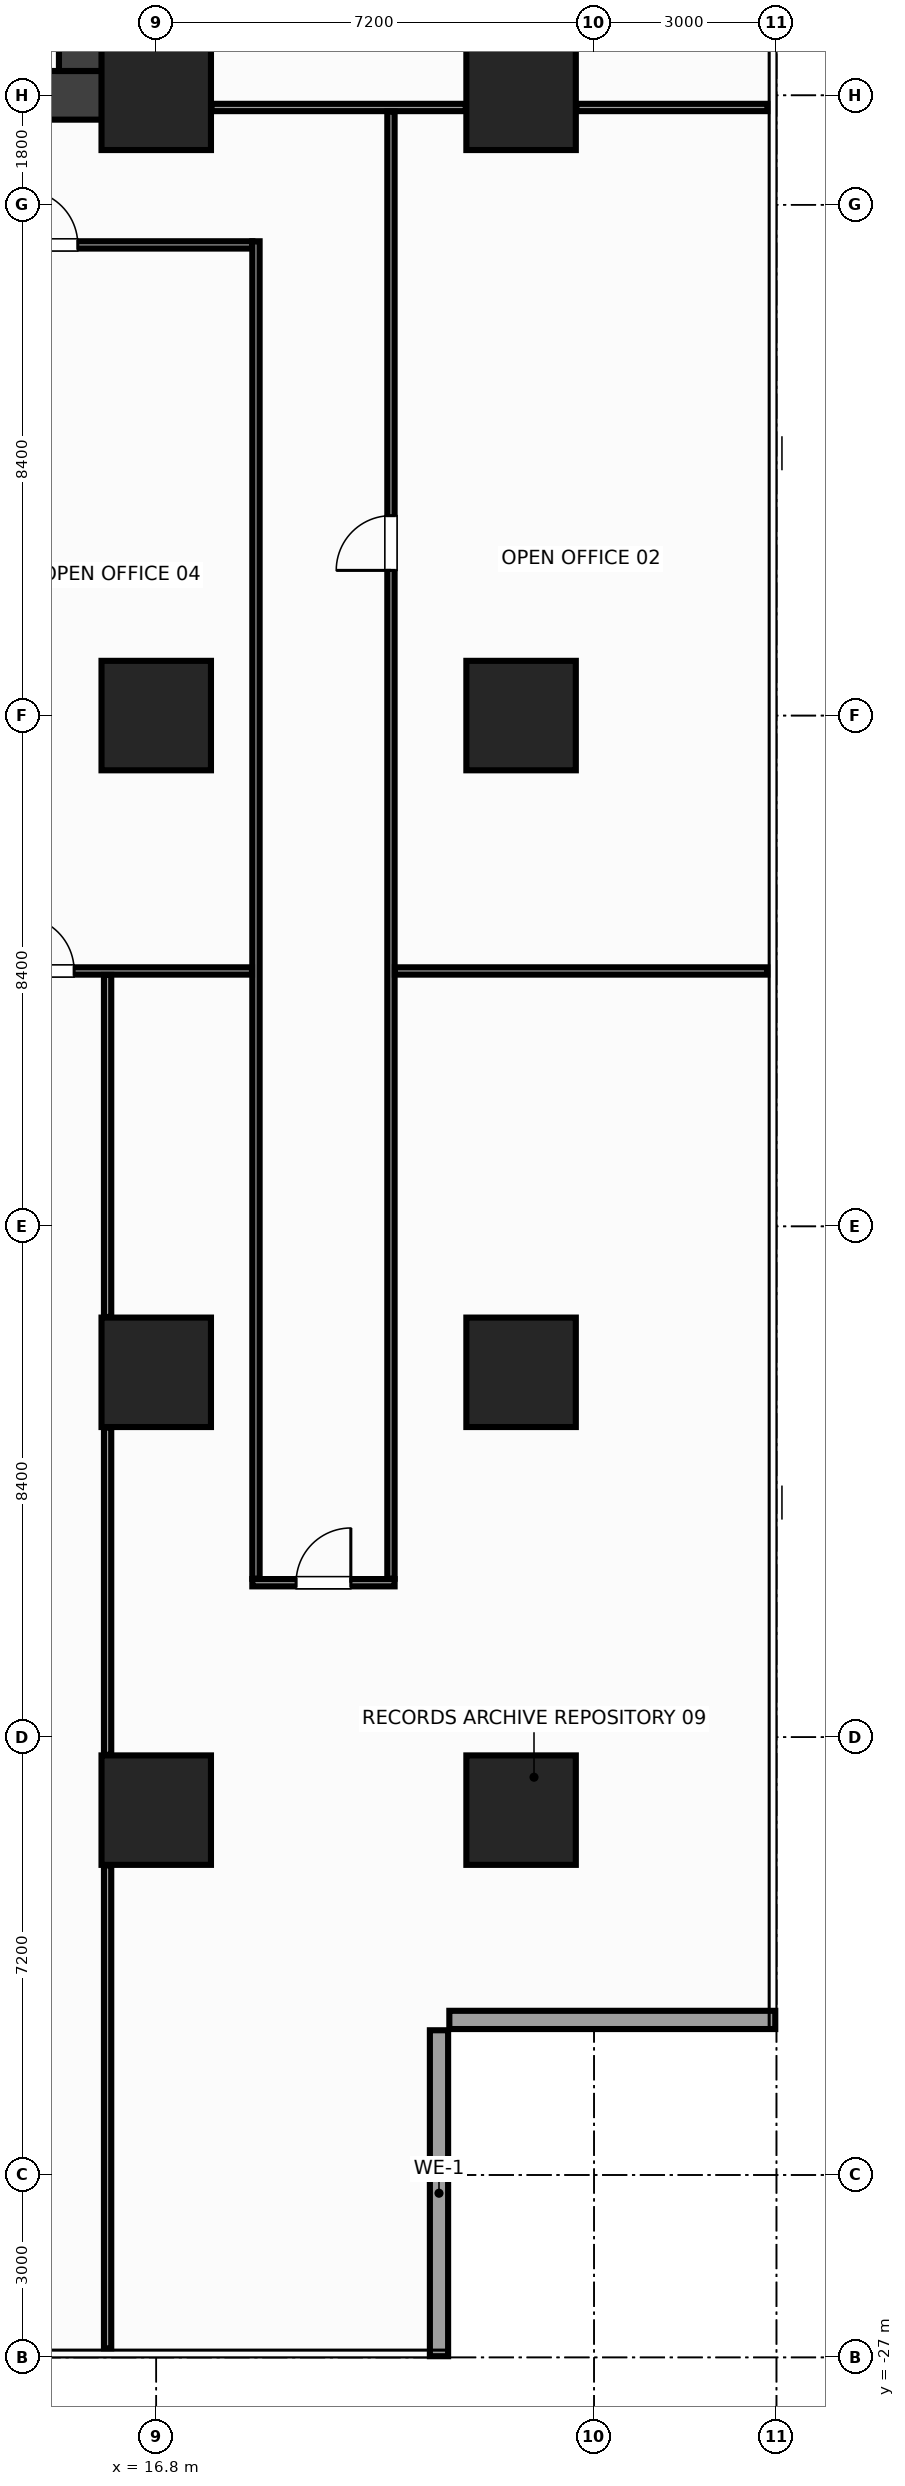
"""IFC4 building model, lengths in metres.
Left out: names, types, materials, properties, quantities, classifications, styles, units other than length and angle.
Written with IfcOpenShell. Run it as: python <this file> out.ifc"""

import sys

from ifc_helpers import new_model, si_unit, direction, frame, frame_2d, origin, origin_2d, place, context, subcontext, project, spatial, rectangle, extrude, source, transform, mapped, element, fill, save


model = new_model("IFC4")
c1 = context("Model", 3, precision=1e-05, world=origin(), true_north=direction((0.0, 1.0)))
c2 = subcontext(c1, "Body", "Model", "MODEL_VIEW")
j1 = project(units=[si_unit("LENGTHUNIT", "METRE"), si_unit("PLANEANGLEUNIT", "RADIAN")], contexts=[c1])
p1 = place(None, origin())
s1 = spatial("IfcSite", under=j1, at=p1, CompositionType="ELEMENT")
p2 = place(p1, origin())
s2 = spatial("IfcBuilding", under=s1, at=p2, CompositionType="ELEMENT")
p3 = place(p2, frame((0.0, 0.0, 30.8)))
s3 = spatial("IfcBuildingStorey", under=s2, at=p3, CompositionType="ELEMENT", Elevation=30.8)
m1 = source(origin(), c2, "Body", "SweptSolid", [
    extrude(rectangle(XDim=32.0, YDim=0.8, at=frame_2d((16.0, 0.0))), origin(), (0.0, 0.0, 1.0), 3.6),
])
p4 = place(p3, frame((-16.0, 10.2, 0.0), z_axis=(0.0, 0.0, 1.0), x_axis=(1.0, 0.0, 0.0)))
e1 = element("IfcWall", 1, at=p4, inside=s3, PredefinedType="SHEAR", context=c2, shape_type="MappedRepresentation", body=[
    mapped(m1, transform((0.0, 0.0, 0.0), x_axis=(1.0, 0.0, 0.0), y_axis=(0.0, 1.0, 0.0), z_axis=(0.0, 0.0, 1.0), scale=1.0)),
])
p5 = place(p4, frame((1.85, 0.0, 0.0)))
e2 = element("IfcOpeningElement", 2, at=p5, cuts=e1, PredefinedType="OPENING", context=c2, shape_type="SweptSolid", body=[
    extrude(rectangle(XDim=1.6, YDim=2.15, at=frame_2d((0.8, 1.075))), frame((0.0, 0.412, 0.0), z_axis=(0.0, -1.0, 0.0), x_axis=(1.0, 0.0, 0.0)), (0.0, 0.0, 1.0), 0.824),
])
p6 = place(p4, frame((28.55, 0.0, 0.0)))
e3 = element("IfcOpeningElement", 3, at=p6, cuts=e1, PredefinedType="OPENING", context=c2, shape_type="SweptSolid", body=[
    extrude(rectangle(XDim=1.6, YDim=2.15, at=frame_2d((0.8, 1.075))), frame((0.0, 0.412, 0.0), z_axis=(0.0, -1.0, 0.0), x_axis=(1.0, 0.0, 0.0)), (0.0, 0.0, 1.0), 0.824),
])
p7 = place(p4, frame((15.25, 0.0, 0.0)))
e4 = element("IfcOpeningElement", 4, at=p7, cuts=e1, PredefinedType="OPENING", context=c2, shape_type="SweptSolid", body=[
    extrude(rectangle(XDim=1.5, YDim=2.2, at=frame_2d((0.75, 1.1))), frame((0.0, 0.412, 0.0), z_axis=(0.0, -1.0, 0.0), x_axis=(1.0, 0.0, 0.0)), (0.0, 0.0, 1.0), 0.824),
])
m2 = source(origin(), c2, "Body", "SweptSolid", [
    extrude(rectangle(XDim=12.8, YDim=0.8, at=frame_2d((6.4, 0.0))), origin(), (0.0, 0.0, 1.0), 3.6),
])
p8 = place(p3, frame((15.6, 10.6, 0.0), z_axis=(0.0, 0.0, 1.0), x_axis=(0.0, 1.0, 0.0)))
e5 = element("IfcWall", 5, at=p8, inside=s3, PredefinedType="SHEAR", context=c2, shape_type="MappedRepresentation", body=[
    mapped(m2, transform((0.0, 0.0, 0.0), x_axis=(1.0, 0.0, 0.0), y_axis=(0.0, 1.0, 0.0), z_axis=(0.0, 0.0, 1.0), scale=1.0)),
])
m3 = source(origin(), c2, "Body", "SweptSolid", [
    extrude(rectangle(XDim=1.8, YDim=1.8, at=origin_2d()), origin(), (0.0, 0.0, 1.0), 3.6),
])
for number, where, z_axis, x_axis in (
    (6, (16.8, -18.0, 0.0), (0.0, 0.0, 1.0), (1.0, 0.0, 0.0)),
    (7, (16.8, -10.8, 0.0), (0.0, 0.0, 1.0), (1.0, 0.0, 0.0)),
    (8, (16.8, 0.0, 0.0), (0.0, 0.0, 1.0), (1.0, 0.0, 0.0)),
    (9, (16.8, 10.2, 0.0), (0.0, 0.0, 1.0), (1.0, 0.0, 0.0)),
    (10, (22.8, -18.0, 0.0), (0.0, 0.0, 1.0), (1.0, 0.0, 0.0)),
    (11, (22.8, -10.8, 0.0), (0.0, 0.0, 1.0), (1.0, 0.0, 0.0)),
    (12, (22.8, 0.0, 0.0), (0.0, 0.0, 1.0), (1.0, 0.0, 0.0)),
    (13, (22.8, 10.2, 0.0), (0.0, 0.0, 1.0), (1.0, 0.0, 0.0)),
):
    element("IfcColumn", number, at=place(p3, frame(where, z_axis=z_axis, x_axis=x_axis)), inside=s3, PredefinedType="COLUMN", context=c2, shape_type="MappedRepresentation", body=[
        mapped(m3, transform((0.0, 0.0, 0.0), x_axis=(1.0, 0.0, 0.0), y_axis=(0.0, 1.0, 0.0), z_axis=(0.0, 0.0, 1.0), scale=1.0)),
    ])
m4 = source(origin(), c2, "Body", "SweptSolid", [
    extrude(rectangle(XDim=5.36, YDim=0.3, at=frame_2d((2.68, 0.0))), origin(), (0.0, 0.0, 1.0), 2.74),
])
for number, where, z_axis, x_axis in (
    (14, (21.45, -26.98, 0.0), (0.0, 0.0, 1.0), (0.0, 1.0, 0.0)),
    (15, (21.62, -21.45, 0.0), (0.0, 0.0, 1.0), (1.0, 0.0, 0.0)),
):
    element("IfcWall", number, at=place(p3, frame(where, z_axis=z_axis, x_axis=x_axis)), inside=s3, PredefinedType="STANDARD", context=c2, shape_type="MappedRepresentation", body=[
        mapped(m4, transform((0.0, 0.0, 0.0), x_axis=(1.0, 0.0, 0.0), y_axis=(0.0, 1.0, 0.0), z_axis=(0.0, 0.0, 1.0), scale=1.0)),
    ])
m5 = source(origin(), c2, "Body", "SweptSolid", [
    extrude(rectangle(XDim=4.18, YDim=0.12, at=frame_2d((2.09, 0.0))), origin(), (0.0, 0.0, 1.0), 2.745),
])
p9 = place(p3, frame((17.71, 10.0, 0.0), z_axis=(0.0, 0.0, 1.0), x_axis=(1.0, 0.0, 0.0)))
e16 = element("IfcWall", 16, at=p9, inside=s3, PredefinedType="PARTITIONING", context=c2, shape_type="MappedRepresentation", body=[
    mapped(m5, transform((0.0, 0.0, 0.0), x_axis=(1.0, 0.0, 0.0), y_axis=(0.0, 1.0, 0.0), z_axis=(0.0, 0.0, 1.0), scale=1.0)),
])
m6 = source(origin(), c2, "Body", "SweptSolid", [
    extrude(rectangle(XDim=3.14, YDim=0.12, at=frame_2d((1.57, 0.0))), origin(), (0.0, 0.0, 1.0), 2.435),
])
p10 = place(p3, frame((23.71, 10.0, 0.0), z_axis=(0.0, 0.0, 1.0), x_axis=(1.0, 0.0, 0.0)))
e17 = element("IfcWall", 17, at=p10, inside=s3, PredefinedType="PARTITIONING", context=c2, shape_type="MappedRepresentation", body=[
    mapped(m6, transform((0.0, 0.0, 0.0), x_axis=(1.0, 0.0, 0.0), y_axis=(0.0, 1.0, 0.0), z_axis=(0.0, 0.0, 1.0), scale=1.0)),
])
m7 = source(origin(), c2, "Body", "SweptSolid", [
    extrude(rectangle(XDim=36.76, YDim=0.12, at=frame_2d((18.38, 0.0))), origin(), (0.0, 0.0, 1.0), 2.745),
])
p11 = place(p3, frame((-18.38, 7.74, 0.0), z_axis=(0.0, 0.0, 1.0), x_axis=(1.0, 0.0, 0.0)))
e18 = element("IfcWall", 18, at=p11, inside=s3, PredefinedType="PARTITIONING", context=c2, shape_type="MappedRepresentation", body=[
    mapped(m7, transform((0.0, 0.0, 0.0), x_axis=(1.0, 0.0, 0.0), y_axis=(0.0, 1.0, 0.0), z_axis=(0.0, 0.0, 1.0), scale=1.0)),
])
p12 = place(p11, frame((2.79, 0.0, 0.0)))
e19 = element("IfcOpeningElement", 19, at=p12, cuts=e18, PredefinedType="OPENING", context=c2, shape_type="SweptSolid", body=[
    extrude(rectangle(XDim=0.9, YDim=2.15, at=frame_2d((0.45, 1.075))), frame((0.0, 0.072, 0.0), z_axis=(0.0, -1.0, 0.0), x_axis=(1.0, 0.0, 0.0)), (0.0, 0.0, 1.0), 0.144),
])
p13 = place(p11, frame((32.99, 0.0, 0.0)))
e20 = element("IfcOpeningElement", 20, at=p13, cuts=e18, PredefinedType="OPENING", context=c2, shape_type="SweptSolid", body=[
    extrude(rectangle(XDim=0.9, YDim=2.15, at=frame_2d((0.45, 1.075))), frame((0.0, 0.072, 0.0), z_axis=(0.0, -1.0, 0.0), x_axis=(1.0, 0.0, 0.0)), (0.0, 0.0, 1.0), 0.144),
])
p14 = place(p11, frame((9.93, 0.0, 0.0)))
e21 = element("IfcOpeningElement", 21, at=p14, cuts=e18, PredefinedType="OPENING", context=c2, shape_type="SweptSolid", body=[
    extrude(rectangle(XDim=0.9, YDim=2.15, at=frame_2d((0.45, 1.075))), frame((0.0, 0.072, 0.0), z_axis=(0.0, -1.0, 0.0), x_axis=(1.0, 0.0, 0.0)), (0.0, 0.0, 1.0), 0.144),
])
p15 = place(p11, frame((18.23, 0.0, 0.0)))
e22 = element("IfcOpeningElement", 22, at=p15, cuts=e18, PredefinedType="OPENING", context=c2, shape_type="SweptSolid", body=[
    extrude(rectangle(XDim=0.9, YDim=2.15, at=frame_2d((0.45, 1.075))), frame((0.0, 0.072, 0.0), z_axis=(0.0, -1.0, 0.0), x_axis=(1.0, 0.0, 0.0)), (0.0, 0.0, 1.0), 0.144),
])
p16 = place(p11, frame((27.03, 0.0, 0.0)))
e23 = element("IfcOpeningElement", 23, at=p16, cuts=e18, PredefinedType="OPENING", context=c2, shape_type="SweptSolid", body=[
    extrude(rectangle(XDim=0.9, YDim=2.15, at=frame_2d((0.45, 1.075))), frame((0.0, 0.072, 0.0), z_axis=(0.0, -1.0, 0.0), x_axis=(1.0, 0.0, 0.0)), (0.0, 0.0, 1.0), 0.144),
])
m8 = source(origin(), c2, "Body", "SweptSolid", [
    extrude(rectangle(XDim=2.34, YDim=0.12, at=frame_2d((1.17, 0.0))), origin(), (0.0, 0.0, 1.0), 2.985),
])
p17 = place(p3, frame((18.38, -14.26, 0.0), z_axis=(0.0, 0.0, 1.0), x_axis=(1.0, 0.0, 0.0)))
e24 = element("IfcWall", 24, at=p17, inside=s3, PredefinedType="PARTITIONING", context=c2, shape_type="MappedRepresentation", body=[
    mapped(m8, transform((0.0, 0.0, 0.0), x_axis=(1.0, 0.0, 0.0), y_axis=(0.0, 1.0, 0.0), z_axis=(0.0, 0.0, 1.0), scale=1.0)),
])
p18 = place(p17, frame((0.72, 0.0, 0.0)))
e25 = element("IfcOpeningElement", 25, at=p18, cuts=e24, PredefinedType="OPENING", context=c2, shape_type="SweptSolid", body=[
    extrude(rectangle(XDim=0.9, YDim=2.15, at=frame_2d((0.45, 1.075))), frame((0.0, 0.072, 0.0), z_axis=(0.0, -1.0, 0.0), x_axis=(1.0, 0.0, 0.0)), (0.0, 0.0, 1.0), 0.144),
])
m9 = source(origin(), c2, "Body", "SweptSolid", [
    extrude(rectangle(XDim=21.995, YDim=0.12, at=frame_2d((10.998, 0.0))), origin(), (0.0, 0.0, 1.0), 2.745),
])
p19 = place(p3, frame((18.44, -14.195, 0.0), z_axis=(0.0, 0.0, 1.0), x_axis=(0.0, 1.0, 0.0)))
e26 = element("IfcWall", 26, at=p19, inside=s3, PredefinedType="PARTITIONING", context=c2, shape_type="MappedRepresentation", body=[
    mapped(m9, transform((0.0, 0.0, 0.0), x_axis=(1.0, 0.0, 0.0), y_axis=(0.0, 1.0, 0.0), z_axis=(0.0, 0.0, 1.0), scale=1.0)),
])
m10 = source(origin(), c2, "Body", "SweptSolid", [
    extrude(rectangle(XDim=24.13, YDim=0.12, at=frame_2d((12.065, 0.0))), origin(), (0.0, 0.0, 1.0), 2.745),
])
p20 = place(p3, frame((20.66, -14.195, 0.0), z_axis=(0.0, 0.0, 1.0), x_axis=(0.0, 1.0, 0.0)))
e27 = element("IfcWall", 27, at=p20, inside=s3, PredefinedType="PARTITIONING", context=c2, shape_type="MappedRepresentation", body=[
    mapped(m10, transform((0.0, 0.0, 0.0), x_axis=(1.0, 0.0, 0.0), y_axis=(0.0, 1.0, 0.0), z_axis=(0.0, 0.0, 1.0), scale=1.0)),
])
p21 = place(p20, frame((16.583, 0.0, 0.0)))
e28 = element("IfcOpeningElement", 28, at=p21, cuts=e27, PredefinedType="OPENING", context=c2, shape_type="SweptSolid", body=[
    extrude(rectangle(XDim=0.9, YDim=2.15, at=frame_2d((0.45, 1.075))), frame((0.0, 0.072, 0.0), z_axis=(0.0, -1.0, 0.0), x_axis=(1.0, 0.0, 0.0)), (0.0, 0.0, 1.0), 0.144),
])
m11 = source(origin(), c2, "Body", "SweptSolid", [
    extrude(rectangle(XDim=36.75, YDim=0.12, at=frame_2d((18.375, 0.0))), origin(), (0.0, 0.0, 1.0), 2.745),
])
p22 = place(p3, frame((-18.375, -4.2, 0.0), z_axis=(0.0, 0.0, 1.0), x_axis=(1.0, 0.0, 0.0)))
e29 = element("IfcWall", 29, at=p22, inside=s3, PredefinedType="PARTITIONING", context=c2, shape_type="MappedRepresentation", body=[
    mapped(m11, transform((0.0, 0.0, 0.0), x_axis=(1.0, 0.0, 0.0), y_axis=(0.0, 1.0, 0.0), z_axis=(0.0, 0.0, 1.0), scale=1.0)),
])
p23 = place(p22, frame((3.725, 0.0, 0.0)))
e30 = element("IfcOpeningElement", 30, at=p23, cuts=e29, PredefinedType="OPENING", context=c2, shape_type="SweptSolid", body=[
    extrude(rectangle(XDim=0.9, YDim=2.15, at=frame_2d((0.45, 1.075))), frame((0.0, 0.072, 0.0), z_axis=(0.0, -1.0, 0.0), x_axis=(1.0, 0.0, 0.0)), (0.0, 0.0, 1.0), 0.144),
])
p24 = place(p22, frame((18.225, 0.0, 0.0)))
e31 = element("IfcOpeningElement", 31, at=p24, cuts=e29, PredefinedType="OPENING", context=c2, shape_type="SweptSolid", body=[
    extrude(rectangle(XDim=0.9, YDim=2.15, at=frame_2d((0.45, 1.075))), frame((0.0, 0.072, 0.0), z_axis=(0.0, -1.0, 0.0), x_axis=(1.0, 0.0, 0.0)), (0.0, 0.0, 1.0), 0.144),
])
p25 = place(p22, frame((32.925, 0.0, 0.0)))
e32 = element("IfcOpeningElement", 32, at=p25, cuts=e29, PredefinedType="OPENING", context=c2, shape_type="SweptSolid", body=[
    extrude(rectangle(XDim=0.9, YDim=2.15, at=frame_2d((0.45, 1.075))), frame((0.0, 0.072, 0.0), z_axis=(0.0, -1.0, 0.0), x_axis=(1.0, 0.0, 0.0)), (0.0, 0.0, 1.0), 0.144),
])
m12 = source(origin(), c2, "Body", "SweptSolid", [
    extrude(rectangle(XDim=6.125, YDim=0.12, at=frame_2d((3.062, 0.0))), origin(), (0.0, 0.0, 1.0), 2.745),
])
p26 = place(p3, frame((20.725, -4.2, 0.0), z_axis=(0.0, 0.0, 1.0), x_axis=(1.0, 0.0, 0.0)))
e33 = element("IfcWall", 33, at=p26, inside=s3, PredefinedType="PARTITIONING", context=c2, shape_type="MappedRepresentation", body=[
    mapped(m12, transform((0.0, 0.0, 0.0), x_axis=(1.0, 0.0, 0.0), y_axis=(0.0, 1.0, 0.0), z_axis=(0.0, 0.0, 1.0), scale=1.0)),
])
m13 = source(origin(), c2, "Body", "SweptSolid", [
    extrude(rectangle(XDim=7.94, YDim=0.12, at=frame_2d((3.97, 0.0))), origin(), (0.0, 0.0, 1.0), 3.36),
])
p27 = place(p3, frame((16.0, -26.85, 0.0), z_axis=(0.0, 0.0, 1.0), x_axis=(0.0, 1.0, 0.0)))
e34 = element("IfcWall", 34, at=p27, inside=s3, PredefinedType="PARTITIONING", context=c2, shape_type="MappedRepresentation", body=[
    mapped(m13, transform((0.0, 0.0, 0.0), x_axis=(1.0, 0.0, 0.0), y_axis=(0.0, 1.0, 0.0), z_axis=(0.0, 0.0, 1.0), scale=1.0)),
])
m14 = source(origin(), c2, "Body", "SweptSolid", [
    extrude(rectangle(XDim=5.38, YDim=0.12, at=frame_2d((2.69, 0.0))), origin(), (0.0, 0.0, 1.0), 3.36),
])
p28 = place(p3, frame((16.0, -17.09, 0.0), z_axis=(0.0, 0.0, 1.0), x_axis=(0.0, 1.0, 0.0)))
e35 = element("IfcWall", 35, at=p28, inside=s3, PredefinedType="PARTITIONING", context=c2, shape_type="MappedRepresentation", body=[
    mapped(m14, transform((0.0, 0.0, 0.0), x_axis=(1.0, 0.0, 0.0), y_axis=(0.0, 1.0, 0.0), z_axis=(0.0, 0.0, 1.0), scale=1.0)),
])
m15 = source(origin(), c2, "Body", "SweptSolid", [
    extrude(rectangle(XDim=5.625, YDim=0.12, at=frame_2d((2.812, 0.0))), origin(), (0.0, 0.0, 1.0), 3.36),
])
p29 = place(p3, frame((16.0, -9.89, 0.0), z_axis=(0.0, 0.0, 1.0), x_axis=(0.0, 1.0, 0.0)))
e36 = element("IfcWall", 36, at=p29, inside=s3, PredefinedType="PARTITIONING", context=c2, shape_type="MappedRepresentation", body=[
    mapped(m15, transform((0.0, 0.0, 0.0), x_axis=(1.0, 0.0, 0.0), y_axis=(0.0, 1.0, 0.0), z_axis=(0.0, 0.0, 1.0), scale=1.0)),
])
m16 = source(origin(), c2, "Body", "SweptSolid", [
    extrude(rectangle(XDim=0.9, YDim=2.15, at=frame_2d((0.45, 1.075))), frame((0.0, 0.025, 0.0), z_axis=(0.0, -1.0, 0.0), x_axis=(1.0, 0.0, 0.0)), (0.0, 0.0, 1.0), 0.05),
])
p30 = place(p21, origin())
e37 = element("IfcDoor", 37, at=p30, inside=s3, OperationType="SINGLE_SWING_LEFT", PredefinedType="DOOR", context=c2, shape_type="MappedRepresentation", body=[
    mapped(m16, transform((0.0, 0.0, 0.0), x_axis=(1.0, 0.0, 0.0), y_axis=(0.0, 1.0, 0.0), z_axis=(0.0, 0.0, 1.0), scale=1.0)),
])
fill(e28, e37)
p31 = place(p13, origin())
e38 = element("IfcDoor", 38, at=p31, inside=s3, OperationType="SINGLE_SWING_LEFT", PredefinedType="DOOR", context=c2, shape_type="MappedRepresentation", body=[
    mapped(m16, transform((0.0, 0.0, 0.0), x_axis=(1.0, 0.0, 0.0), y_axis=(0.0, 1.0, 0.0), z_axis=(0.0, 0.0, 1.0), scale=1.0)),
])
fill(e20, e38)
p32 = place(p18, origin())
e39 = element("IfcDoor", 39, at=p32, inside=s3, OperationType="SINGLE_SWING_RIGHT", PredefinedType="DOOR", context=c2, shape_type="MappedRepresentation", body=[
    mapped(m16, transform((0.0, 0.0, 0.0), x_axis=(1.0, 0.0, 0.0), y_axis=(0.0, 1.0, 0.0), z_axis=(0.0, 0.0, 1.0), scale=1.0)),
])
fill(e25, e39)
p33 = place(p25, origin())
e40 = element("IfcDoor", 40, at=p33, inside=s3, OperationType="SINGLE_SWING_LEFT", PredefinedType="DOOR", context=c2, shape_type="MappedRepresentation", body=[
    mapped(m16, transform((0.0, 0.0, 0.0), x_axis=(1.0, 0.0, 0.0), y_axis=(0.0, 1.0, 0.0), z_axis=(0.0, 0.0, 1.0), scale=1.0)),
])
fill(e32, e40)
save(model, sys.argv[1])
